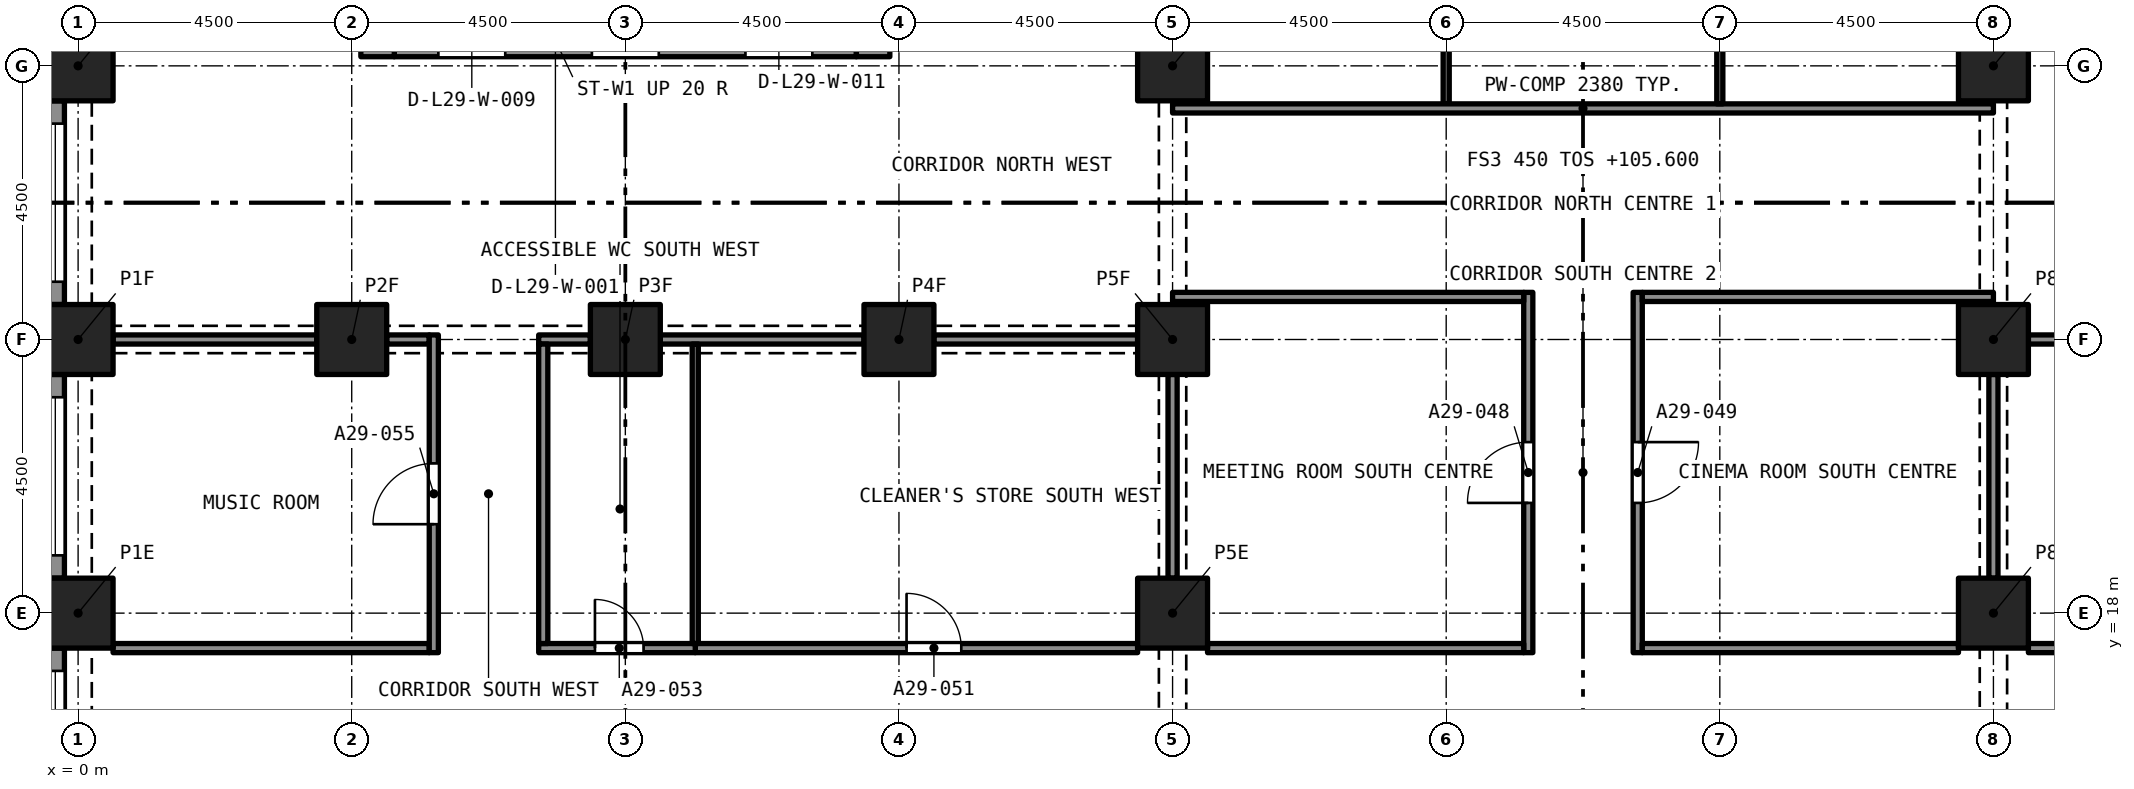
"""IFC4 building model, lengths in metres.
Left out: names, types, materials, properties, quantities, classifications, styles, units other than length and angle.
Written with IfcOpenShell. Run it as: python <this file> out.ifc"""

import sys

from ifc_helpers import new_model, si_unit, direction, frame, frame_2d, origin, origin_2d, place, context, subcontext, project, spatial, rectangle, extrude, element, fill, save


model = new_model("IFC4")
c1 = context("Model", 3, precision=1e-05, world=origin(), true_north=direction((0.0, 1.0)))
c2 = subcontext(c1, "Body", "Model", "MODEL_VIEW")
j1 = project(units=[si_unit("LENGTHUNIT", "METRE"), si_unit("PLANEANGLEUNIT", "RADIAN")], contexts=[c1])
p1 = place(None, origin())
s1 = spatial("IfcSite", under=j1, at=p1, CompositionType="ELEMENT")
p2 = place(p1, origin())
s2 = spatial("IfcBuilding", under=s1, at=p2, CompositionType="ELEMENT")
p3 = place(p2, frame((0.0, 0.0, 105.6)))
s3 = spatial("IfcBuildingStorey", under=s2, at=p3, CompositionType="ELEMENT", Elevation=105.6)
for number, where, z_axis, x_axis in (
    (1, (0.0, 18.0, 0.0), (0.0, 0.0, 1.0), (1.0, 0.0, 0.0)),
    (2, (18.0, 18.0, 0.0), (0.0, 0.0, 1.0), (1.0, 0.0, 0.0)),
    (3, (31.5, 18.0, 0.0), (0.0, 0.0, 1.0), (1.0, 0.0, 0.0)),
    (4, (0.0, 22.5, 0.0), (0.0, 0.0, 1.0), (1.0, 0.0, 0.0)),
    (5, (4.5, 22.5, 0.0), (0.0, 0.0, 1.0), (1.0, 0.0, 0.0)),
    (6, (9.0, 22.5, 0.0), (0.0, 0.0, 1.0), (1.0, 0.0, 0.0)),
    (7, (13.5, 22.5, 0.0), (0.0, 0.0, 1.0), (1.0, 0.0, 0.0)),
    (8, (18.0, 22.5, 0.0), (0.0, 0.0, 1.0), (1.0, 0.0, 0.0)),
    (9, (31.5, 22.5, 0.0), (0.0, 0.0, 1.0), (1.0, 0.0, 0.0)),
    (10, (0.0, 27.0, 0.0), (0.0, 0.0, 1.0), (1.0, 0.0, 0.0)),
    (11, (18.0, 27.0, 0.0), (0.0, 0.0, 1.0), (1.0, 0.0, 0.0)),
    (12, (31.5, 27.0, 0.0), (0.0, 0.0, 1.0), (1.0, 0.0, 0.0)),
):
    element("IfcColumn", number, at=place(p3, frame(where, z_axis=z_axis, x_axis=x_axis)), inside=s3, PredefinedType="COLUMN", context=c2, shape_type="SweptSolid", body=[
        extrude(rectangle(XDim=1.15, YDim=1.15, at=origin_2d()), origin(), (0.0, 0.0, 1.0), 3.2),
    ])
p4 = place(p3, frame((5.2, 27.425, 0.0), z_axis=(0.0, 0.0, 1.0), x_axis=(1.0, 0.0, 0.0)))
e13 = element("IfcWall", 13, at=p4, inside=s3, PredefinedType="SOLIDWALL", context=c2, shape_type="SweptSolid", body=[
    extrude(rectangle(XDim=7.6, YDim=0.55, at=frame_2d((3.8, 0.0))), origin(), (0.0, 0.0, 1.0), 3.2),
])
p5 = place(p4, frame((0.725, 0.0, 0.0)))
e14 = element("IfcOpeningElement", 14, at=p5, cuts=e13, PredefinedType="OPENING", context=c2, shape_type="SweptSolid", body=[
    extrude(rectangle(XDim=1.1, YDim=2.1, at=frame_2d((0.55, 1.05))), frame((0.0, 0.285, 0.0), z_axis=(0.0, -1.0, 0.0), x_axis=(1.0, 0.0, 0.0)), (0.0, 0.0, 1.0), 0.57),
])
p6 = place(p4, frame((3.25, 0.0, 0.0)))
e15 = element("IfcOpeningElement", 15, at=p6, cuts=e13, PredefinedType="OPENING", context=c2, shape_type="SweptSolid", body=[
    extrude(rectangle(XDim=1.1, YDim=2.1, at=frame_2d((0.55, 1.05))), frame((0.0, 0.285, 0.0), z_axis=(0.0, -1.0, 0.0), x_axis=(1.0, 0.0, 0.0)), (0.0, 0.0, 1.0), 0.57),
])
p7 = place(p4, frame((5.775, 0.0, 0.0)))
e16 = element("IfcOpeningElement", 16, at=p7, cuts=e13, PredefinedType="OPENING", context=c2, shape_type="SweptSolid", body=[
    extrude(rectangle(XDim=1.1, YDim=2.1, at=frame_2d((0.55, 1.05))), frame((0.0, 0.285, 0.0), z_axis=(0.0, -1.0, 0.0), x_axis=(1.0, 0.0, 0.0)), (0.0, 0.0, 1.0), 0.57),
])
p8 = place(p3, frame((4.925, 27.15, 0.0), z_axis=(0.0, 0.0, 1.0), x_axis=(0.0, 1.0, 0.0)))
e17 = element("IfcWall", 17, at=p8, inside=s3, PredefinedType="SOLIDWALL", context=c2, shape_type="SweptSolid", body=[
    extrude(rectangle(XDim=13.2, YDim=0.55, at=frame_2d((6.6, 0.0))), origin(), (0.0, 0.0, 1.0), 3.2),
])
p9 = place(p8, frame((8.8, 0.0, 0.0)))
e18 = element("IfcOpeningElement", 18, at=p9, cuts=e17, PredefinedType="OPENING", context=c2, shape_type="SweptSolid", body=[
    extrude(rectangle(XDim=1.2, YDim=2.1, at=frame_2d((0.6, 1.05))), frame((0.0, 0.285, 0.0), z_axis=(0.0, -1.0, 0.0), x_axis=(1.0, 0.0, 0.0)), (0.0, 0.0, 1.0), 0.57),
])
p10 = place(p3, frame((13.075, 27.15, 0.0), z_axis=(0.0, 0.0, 1.0), x_axis=(0.0, 1.0, 0.0)))
e19 = element("IfcWall", 19, at=p10, inside=s3, PredefinedType="SOLIDWALL", context=c2, shape_type="SweptSolid", body=[
    extrude(rectangle(XDim=13.2, YDim=0.55, at=frame_2d((6.6, 0.0))), origin(), (0.0, 0.0, 1.0), 3.2),
])
p11 = place(p10, frame((10.95, 0.0, 0.0)))
e20 = element("IfcOpeningElement", 20, at=p11, cuts=e19, PredefinedType="OPENING", context=c2, shape_type="SweptSolid", body=[
    extrude(rectangle(XDim=1.1, YDim=2.1, at=frame_2d((0.55, 1.05))), frame((0.0, 0.285, 0.0), z_axis=(0.0, -1.0, 0.0), x_axis=(1.0, 0.0, 0.0)), (0.0, 0.0, 1.0), 0.57),
])
p12 = place(p10, frame((8.8, 0.0, 0.0)))
e21 = element("IfcOpeningElement", 21, at=p12, cuts=e19, PredefinedType="OPENING", context=c2, shape_type="SweptSolid", body=[
    extrude(rectangle(XDim=1.2, YDim=2.1, at=frame_2d((0.6, 1.05))), frame((0.0, 0.285, 0.0), z_axis=(0.0, -1.0, 0.0), x_axis=(1.0, 0.0, 0.0)), (0.0, 0.0, 1.0), 0.57),
])
p13 = place(p3, frame((-0.375, 23.075, 0.0), z_axis=(0.0, 0.0, 1.0), x_axis=(0.0, 1.0, 0.0)))
e22 = element("IfcWall", 22, at=p13, inside=s3, PredefinedType="SOLIDWALL", context=c2, shape_type="SweptSolid", body=[
    extrude(rectangle(XDim=3.35, YDim=0.3, at=frame_2d((1.675, 0.0))), origin(), (0.0, 0.0, 1.0), 3.2),
])
p14 = place(p13, frame((0.375, 0.0, 0.45)))
e23 = element("IfcOpeningElement", 23, at=p14, cuts=e22, PredefinedType="OPENING", context=c2, shape_type="SweptSolid", body=[
    extrude(rectangle(XDim=2.6, YDim=1.95, at=frame_2d((1.3, 0.975))), frame((0.0, 0.16, 0.0), z_axis=(0.0, -1.0, 0.0), x_axis=(1.0, 0.0, 0.0)), (0.0, 0.0, 1.0), 0.32),
])
p15 = place(p3, frame((-0.375, 18.575, 0.0), z_axis=(0.0, 0.0, 1.0), x_axis=(0.0, 1.0, 0.0)))
e24 = element("IfcWall", 24, at=p15, inside=s3, PredefinedType="SOLIDWALL", context=c2, shape_type="SweptSolid", body=[
    extrude(rectangle(XDim=3.35, YDim=0.3, at=frame_2d((1.675, 0.0))), origin(), (0.0, 0.0, 1.0), 3.2),
])
p16 = place(p15, frame((0.375, 0.0, 0.45)))
e25 = element("IfcOpeningElement", 25, at=p16, cuts=e24, PredefinedType="OPENING", context=c2, shape_type="SweptSolid", body=[
    extrude(rectangle(XDim=2.6, YDim=1.95, at=frame_2d((1.3, 0.975))), frame((0.0, 0.16, 0.0), z_axis=(0.0, -1.0, 0.0), x_axis=(1.0, 0.0, 0.0)), (0.0, 0.0, 1.0), 0.32),
])
p17 = place(p3, frame((-0.375, 14.075, 0.0), z_axis=(0.0, 0.0, 1.0), x_axis=(0.0, 1.0, 0.0)))
e26 = element("IfcWall", 26, at=p17, inside=s3, PredefinedType="SOLIDWALL", context=c2, shape_type="SweptSolid", body=[
    extrude(rectangle(XDim=3.35, YDim=0.3, at=frame_2d((1.675, 0.0))), origin(), (0.0, 0.0, 1.0), 3.2),
])
p18 = place(p17, frame((0.375, 0.0, 0.45)))
e27 = element("IfcOpeningElement", 27, at=p18, cuts=e26, PredefinedType="OPENING", context=c2, shape_type="SweptSolid", body=[
    extrude(rectangle(XDim=2.6, YDim=1.95, at=frame_2d((1.3, 0.975))), frame((0.0, 0.16, 0.0), z_axis=(0.0, -1.0, 0.0), x_axis=(1.0, 0.0, 0.0)), (0.0, 0.0, 1.0), 0.32),
])
p19 = place(p3, frame((23.85, 17.35, 0.0), z_axis=(0.0, 0.0, 1.0), x_axis=(0.0, 1.0, 0.0)))
e28 = element("IfcWall", 28, at=p19, inside=s3, PredefinedType="PARTITIONING", context=c2, shape_type="SweptSolid", body=[
    extrude(rectangle(XDim=5.925, YDim=0.15, at=frame_2d((2.962, 0.0))), origin(), (0.0, 0.0, 1.0), 2.75),
])
p20 = place(p19, frame((2.462, 0.0, 0.0)))
e29 = element("IfcOpeningElement", 29, at=p20, cuts=e28, PredefinedType="OPENING", context=c2, shape_type="SweptSolid", body=[
    extrude(rectangle(XDim=1.0, YDim=2.1, at=frame_2d((0.5, 1.05))), frame((0.0, 0.085, 0.0), z_axis=(0.0, -1.0, 0.0), x_axis=(1.0, 0.0, 0.0)), (0.0, 0.0, 1.0), 0.17),
])
p21 = place(p3, frame((25.65, 23.275, 0.0), z_axis=(0.0, 0.0, 1.0), x_axis=(0.0, -1.0, 0.0)))
e30 = element("IfcWall", 30, at=p21, inside=s3, PredefinedType="PARTITIONING", context=c2, shape_type="SweptSolid", body=[
    extrude(rectangle(XDim=5.925, YDim=0.15, at=frame_2d((2.962, 0.0))), origin(), (0.0, 0.0, 1.0), 2.75),
])
p22 = place(p21, frame((2.462, 0.0, 0.0)))
e31 = element("IfcOpeningElement", 31, at=p22, cuts=e30, PredefinedType="OPENING", context=c2, shape_type="SweptSolid", body=[
    extrude(rectangle(XDim=1.0, YDim=2.1, at=frame_2d((0.5, 1.05))), frame((0.0, 0.085, 0.0), z_axis=(0.0, -1.0, 0.0), x_axis=(1.0, 0.0, 0.0)), (0.0, 0.0, 1.0), 0.17),
])
for number, where, z_axis, x_axis in (
    (32, (18.575, 17.425, 0.0), (0.0, 0.0, 1.0), (1.0, 0.0, 0.0)),
    (33, (25.725, 17.425, 0.0), (0.0, 0.0, 1.0), (1.0, 0.0, 0.0)),
):
    element("IfcWall", number, at=place(p3, frame(where, z_axis=z_axis, x_axis=x_axis)), inside=s3, PredefinedType="PARTITIONING", context=c2, shape_type="SweptSolid", body=[
        extrude(rectangle(XDim=5.2, YDim=0.15, at=frame_2d((2.6, 0.0))), origin(), (0.0, 0.0, 1.0), 2.75),
    ])
p23 = place(p3, frame((32.075, 17.425, 0.0), z_axis=(0.0, 0.0, 1.0), x_axis=(1.0, 0.0, 0.0)))
e34 = element("IfcWall", 34, at=p23, inside=s3, PredefinedType="PARTITIONING", context=c2, shape_type="SweptSolid", body=[
    extrude(rectangle(XDim=7.275, YDim=0.15, at=frame_2d((3.638, 0.0))), origin(), (0.0, 0.0, 1.0), 2.9),
])
p24 = place(p23, frame((2.9, 0.0, 0.0)))
e35 = element("IfcOpeningElement", 35, at=p24, cuts=e34, PredefinedType="OPENING", context=c2, shape_type="SweptSolid", body=[
    extrude(rectangle(XDim=0.9, YDim=2.1, at=frame_2d((0.45, 1.05))), frame((0.0, 0.085, 0.0), z_axis=(0.0, -1.0, 0.0), x_axis=(1.0, 0.0, 0.0)), (0.0, 0.0, 1.0), 0.17),
])
p25 = place(p3, frame((10.15, 17.425, 0.0), z_axis=(0.0, 0.0, 1.0), x_axis=(1.0, 0.0, 0.0)))
e36 = element("IfcWall", 36, at=p25, inside=s3, PredefinedType="PARTITIONING", context=c2, shape_type="SweptSolid", body=[
    extrude(rectangle(XDim=7.275, YDim=0.15, at=frame_2d((3.638, 0.0))), origin(), (0.0, 0.0, 1.0), 2.9),
])
p26 = place(p25, frame((3.475, 0.0, 0.0)))
e37 = element("IfcOpeningElement", 37, at=p26, cuts=e36, PredefinedType="OPENING", context=c2, shape_type="SweptSolid", body=[
    extrude(rectangle(XDim=0.9, YDim=2.1, at=frame_2d((0.45, 1.05))), frame((0.0, 0.085, 0.0), z_axis=(0.0, -1.0, 0.0), x_axis=(1.0, 0.0, 0.0)), (0.0, 0.0, 1.0), 0.17),
])
p27 = place(p3, frame((7.575, 17.425, 0.0), z_axis=(0.0, 0.0, 1.0), x_axis=(1.0, 0.0, 0.0)))
e38 = element("IfcWall", 38, at=p27, inside=s3, PredefinedType="PARTITIONING", context=c2, shape_type="SweptSolid", body=[
    extrude(rectangle(XDim=2.575, YDim=0.15, at=frame_2d((1.288, 0.0))), origin(), (0.0, 0.0, 1.0), 2.9),
])
p28 = place(p27, frame((0.925, 0.0, 0.0)))
e39 = element("IfcOpeningElement", 39, at=p28, cuts=e38, PredefinedType="OPENING", context=c2, shape_type="SweptSolid", body=[
    extrude(rectangle(XDim=0.8, YDim=2.1, at=frame_2d((0.4, 1.05))), frame((0.0, 0.085, 0.0), z_axis=(0.0, -1.0, 0.0), x_axis=(1.0, 0.0, 0.0)), (0.0, 0.0, 1.0), 0.17),
])
p29 = place(p3, frame((0.575, 17.425, 0.0), z_axis=(0.0, 0.0, 1.0), x_axis=(1.0, 0.0, 0.0)))
e40 = element("IfcWall", 40, at=p29, inside=s3, PredefinedType="PARTITIONING", context=c2, shape_type="SweptSolid", body=[
    extrude(rectangle(XDim=5.2, YDim=0.15, at=frame_2d((2.6, 0.0))), origin(), (0.0, 0.0, 1.0), 2.9),
])
p30 = place(p3, frame((22.5, 26.375, 0.0), z_axis=(0.0, 0.0, 1.0), x_axis=(0.0, 1.0, 0.0)))
e41 = element("IfcWall", 41, at=p30, inside=s3, PredefinedType="PARTITIONING", context=c2, shape_type="SweptSolid", body=[
    extrude(rectangle(XDim=10.125, YDim=0.1, at=frame_2d((5.062, 0.0))), origin(), (0.0, 0.0, 1.0), 2.75),
])
p31 = place(p3, frame((18.0, 26.3, 0.0), z_axis=(0.0, 0.0, 1.0), x_axis=(1.0, 0.0, 0.0)))
e42 = element("IfcWall", 42, at=p31, inside=s3, PredefinedType="PARTITIONING", context=c2, shape_type="SweptSolid", body=[
    extrude(rectangle(XDim=13.5, YDim=0.15, at=frame_2d((6.75, 0.0))), origin(), (0.0, 0.0, 1.0), 2.38),
])
p32 = place(p3, frame((27.0, 26.375, 0.0), z_axis=(0.0, 0.0, 1.0), x_axis=(0.0, 1.0, 0.0)))
e43 = element("IfcWall", 43, at=p32, inside=s3, PredefinedType="PARTITIONING", context=c2, shape_type="SweptSolid", body=[
    extrude(rectangle(XDim=10.125, YDim=0.1, at=frame_2d((5.062, 0.0))), origin(), (0.0, 0.0, 1.0), 2.75),
])
p33 = place(p3, frame((18.0, 23.2, 0.0), z_axis=(0.0, 0.0, 1.0), x_axis=(1.0, 0.0, 0.0)))
e44 = element("IfcWall", 44, at=p33, inside=s3, PredefinedType="PARTITIONING", context=c2, shape_type="SweptSolid", body=[
    extrude(rectangle(XDim=5.775, YDim=0.15, at=frame_2d((2.887, 0.0))), origin(), (0.0, 0.0, 1.0), 2.75),
])
p34 = place(p3, frame((18.0, 18.575, 0.0), z_axis=(0.0, 0.0, 1.0), x_axis=(0.0, 1.0, 0.0)))
e45 = element("IfcWall", 45, at=p34, inside=s3, PredefinedType="PARTITIONING", context=c2, shape_type="SweptSolid", body=[
    extrude(rectangle(XDim=3.35, YDim=0.15, at=frame_2d((1.675, 0.0))), origin(), (0.0, 0.0, 1.0), 2.38),
])
p35 = place(p3, frame((25.725, 23.2, 0.0), z_axis=(0.0, 0.0, 1.0), x_axis=(1.0, 0.0, 0.0)))
e46 = element("IfcWall", 46, at=p35, inside=s3, PredefinedType="PARTITIONING", context=c2, shape_type="SweptSolid", body=[
    extrude(rectangle(XDim=5.775, YDim=0.15, at=frame_2d((2.887, 0.0))), origin(), (0.0, 0.0, 1.0), 2.75),
])
p36 = place(p3, frame((31.5, 18.575, 0.0), z_axis=(0.0, 0.0, 1.0), x_axis=(0.0, 1.0, 0.0)))
e47 = element("IfcWall", 47, at=p36, inside=s3, PredefinedType="PARTITIONING", context=c2, shape_type="SweptSolid", body=[
    extrude(rectangle(XDim=3.35, YDim=0.15, at=frame_2d((1.675, 0.0))), origin(), (0.0, 0.0, 1.0), 2.38),
])
p37 = place(p3, frame((32.075, 22.5, 0.0), z_axis=(0.0, 0.0, 1.0), x_axis=(1.0, 0.0, 0.0)))
e48 = element("IfcWall", 48, at=p37, inside=s3, PredefinedType="PARTITIONING", context=c2, shape_type="SweptSolid", body=[
    extrude(rectangle(XDim=9.85, YDim=0.15, at=frame_2d((4.925, 0.0))), origin(), (0.0, 0.0, 1.0), 2.9),
])
for number, where, z_axis, x_axis in (
    (49, (14.075, 22.5, 0.0), (0.0, 0.0, 1.0), (1.0, 0.0, 0.0)),
    (50, (9.575, 22.5, 0.0), (0.0, 0.0, 1.0), (1.0, 0.0, 0.0)),
):
    element("IfcWall", number, at=place(p3, frame(where, z_axis=z_axis, x_axis=x_axis)), inside=s3, PredefinedType="PARTITIONING", context=c2, shape_type="SweptSolid", body=[
        extrude(rectangle(XDim=3.35, YDim=0.15, at=frame_2d((1.675, 0.0))), origin(), (0.0, 0.0, 1.0), 2.38),
    ])
p38 = place(p3, frame((7.575, 22.5, 0.0), z_axis=(0.0, 0.0, 1.0), x_axis=(1.0, 0.0, 0.0)))
e51 = element("IfcWall", 51, at=p38, inside=s3, PredefinedType="PARTITIONING", context=c2, shape_type="SweptSolid", body=[
    extrude(rectangle(XDim=0.85, YDim=0.15, at=frame_2d((0.425, 0.0))), origin(), (0.0, 0.0, 1.0), 2.38),
])
p39 = place(p3, frame((5.075, 22.5, 0.0), z_axis=(0.0, 0.0, 1.0), x_axis=(1.0, 0.0, 0.0)))
e52 = element("IfcWall", 52, at=p39, inside=s3, PredefinedType="PARTITIONING", context=c2, shape_type="SweptSolid", body=[
    extrude(rectangle(XDim=0.7, YDim=0.15, at=frame_2d((0.35, 0.0))), origin(), (0.0, 0.0, 1.0), 2.38),
])
p40 = place(p3, frame((0.575, 22.5, 0.0), z_axis=(0.0, 0.0, 1.0), x_axis=(1.0, 0.0, 0.0)))
e53 = element("IfcWall", 53, at=p40, inside=s3, PredefinedType="PARTITIONING", context=c2, shape_type="SweptSolid", body=[
    extrude(rectangle(XDim=3.35, YDim=0.15, at=frame_2d((1.675, 0.0))), origin(), (0.0, 0.0, 1.0), 2.38),
])
p41 = place(p3, frame((7.65, 17.5, 0.0), z_axis=(0.0, 0.0, 1.0), x_axis=(0.0, 1.0, 0.0)))
e54 = element("IfcWall", 54, at=p41, inside=s3, PredefinedType="PARTITIONING", context=c2, shape_type="SweptSolid", body=[
    extrude(rectangle(XDim=4.925, YDim=0.15, at=frame_2d((2.462, 0.0))), origin(), (0.0, 0.0, 1.0), 2.9),
])
p42 = place(p3, frame((5.85, 17.35, 0.0), z_axis=(0.0, 0.0, 1.0), x_axis=(0.0, 1.0, 0.0)))
e55 = element("IfcWall", 55, at=p42, inside=s3, PredefinedType="PARTITIONING", context=c2, shape_type="SweptSolid", body=[
    extrude(rectangle(XDim=5.225, YDim=0.15, at=frame_2d((2.612, 0.0))), origin(), (0.0, 0.0, 1.0), 2.9),
])
p43 = place(p42, frame((2.113, 0.0, 0.0)))
e56 = element("IfcOpeningElement", 56, at=p43, cuts=e55, PredefinedType="OPENING", context=c2, shape_type="SweptSolid", body=[
    extrude(rectangle(XDim=1.0, YDim=2.1, at=frame_2d((0.5, 1.05))), frame((0.0, 0.085, 0.0), z_axis=(0.0, -1.0, 0.0), x_axis=(1.0, 0.0, 0.0)), (0.0, 0.0, 1.0), 0.17),
])
p44 = place(p3, frame((10.15, 17.5, 0.0), z_axis=(0.0, 0.0, 1.0), x_axis=(0.0, 1.0, 0.0)))
e57 = element("IfcWall", 57, at=p44, inside=s3, PredefinedType="PARTITIONING", context=c2, shape_type="SweptSolid", body=[
    extrude(rectangle(XDim=4.925, YDim=0.1, at=frame_2d((2.462, 0.0))), origin(), (0.0, 0.0, 1.0), 2.9),
])
p45 = place(p14, origin())
e58 = element("IfcWindow", 58, at=p45, inside=s3, PartitioningType="SINGLE_PANEL", PredefinedType="WINDOW", context=c2, shape_type="SweptSolid", body=[
    extrude(rectangle(XDim=2.6, YDim=1.95, at=frame_2d((1.3, 0.975))), frame((0.0, 0.03, 0.0), z_axis=(0.0, -1.0, 0.0), x_axis=(1.0, 0.0, 0.0)), (0.0, 0.0, 1.0), 0.06),
])
fill(e23, e58)
p46 = place(p16, origin())
e59 = element("IfcWindow", 59, at=p46, inside=s3, PartitioningType="SINGLE_PANEL", PredefinedType="WINDOW", context=c2, shape_type="SweptSolid", body=[
    extrude(rectangle(XDim=2.6, YDim=1.95, at=frame_2d((1.3, 0.975))), frame((0.0, 0.03, 0.0), z_axis=(0.0, -1.0, 0.0), x_axis=(1.0, 0.0, 0.0)), (0.0, 0.0, 1.0), 0.06),
])
fill(e25, e59)
p47 = place(p18, origin())
e60 = element("IfcWindow", 60, at=p47, inside=s3, PartitioningType="SINGLE_PANEL", PredefinedType="WINDOW", context=c2, shape_type="SweptSolid", body=[
    extrude(rectangle(XDim=2.6, YDim=1.95, at=frame_2d((1.3, 0.975))), frame((0.0, 0.03, 0.0), z_axis=(0.0, -1.0, 0.0), x_axis=(1.0, 0.0, 0.0)), (0.0, 0.0, 1.0), 0.06),
])
fill(e27, e60)
p48 = place(p20, origin())
e61 = element("IfcDoor", 61, at=p48, inside=s3, OperationType="SINGLE_SWING_RIGHT", PredefinedType="DOOR", context=c2, shape_type="SweptSolid", body=[
    extrude(rectangle(XDim=1.0, YDim=2.1, at=frame_2d((0.5, 1.05))), frame((0.0, 0.025, 0.0), z_axis=(0.0, -1.0, 0.0), x_axis=(1.0, 0.0, 0.0)), (0.0, 0.0, 1.0), 0.05),
])
fill(e29, e61)
p49 = place(p22, origin())
e62 = element("IfcDoor", 62, at=p49, inside=s3, OperationType="SINGLE_SWING_RIGHT", PredefinedType="DOOR", context=c2, shape_type="SweptSolid", body=[
    extrude(rectangle(XDim=1.0, YDim=2.1, at=frame_2d((0.5, 1.05))), frame((0.0, 0.025, 0.0), z_axis=(0.0, -1.0, 0.0), x_axis=(1.0, 0.0, 0.0)), (0.0, 0.0, 1.0), 0.05),
])
fill(e31, e62)
p50 = place(p26, origin())
e63 = element("IfcDoor", 63, at=p50, inside=s3, OperationType="SINGLE_SWING_RIGHT", PredefinedType="DOOR", context=c2, shape_type="SweptSolid", body=[
    extrude(rectangle(XDim=0.9, YDim=2.1, at=frame_2d((0.45, 1.05))), frame((0.0, 0.025, 0.0), z_axis=(0.0, -1.0, 0.0), x_axis=(1.0, 0.0, 0.0)), (0.0, 0.0, 1.0), 0.05),
])
fill(e37, e63)
p51 = place(p28, origin())
e64 = element("IfcDoor", 64, at=p51, inside=s3, OperationType="SINGLE_SWING_RIGHT", PredefinedType="DOOR", context=c2, shape_type="SweptSolid", body=[
    extrude(rectangle(XDim=0.8, YDim=2.1, at=frame_2d((0.4, 1.05))), frame((0.0, 0.025, 0.0), z_axis=(0.0, -1.0, 0.0), x_axis=(1.0, 0.0, 0.0)), (0.0, 0.0, 1.0), 0.05),
])
fill(e39, e64)
p52 = place(p43, origin())
e65 = element("IfcDoor", 65, at=p52, inside=s3, OperationType="SINGLE_SWING_LEFT", PredefinedType="DOOR", context=c2, shape_type="SweptSolid", body=[
    extrude(rectangle(XDim=1.0, YDim=2.1, at=frame_2d((0.5, 1.05))), frame((0.0, 0.025, 0.0), z_axis=(0.0, -1.0, 0.0), x_axis=(1.0, 0.0, 0.0)), (0.0, 0.0, 1.0), 0.05),
])
fill(e56, e65)
save(model, sys.argv[1])
